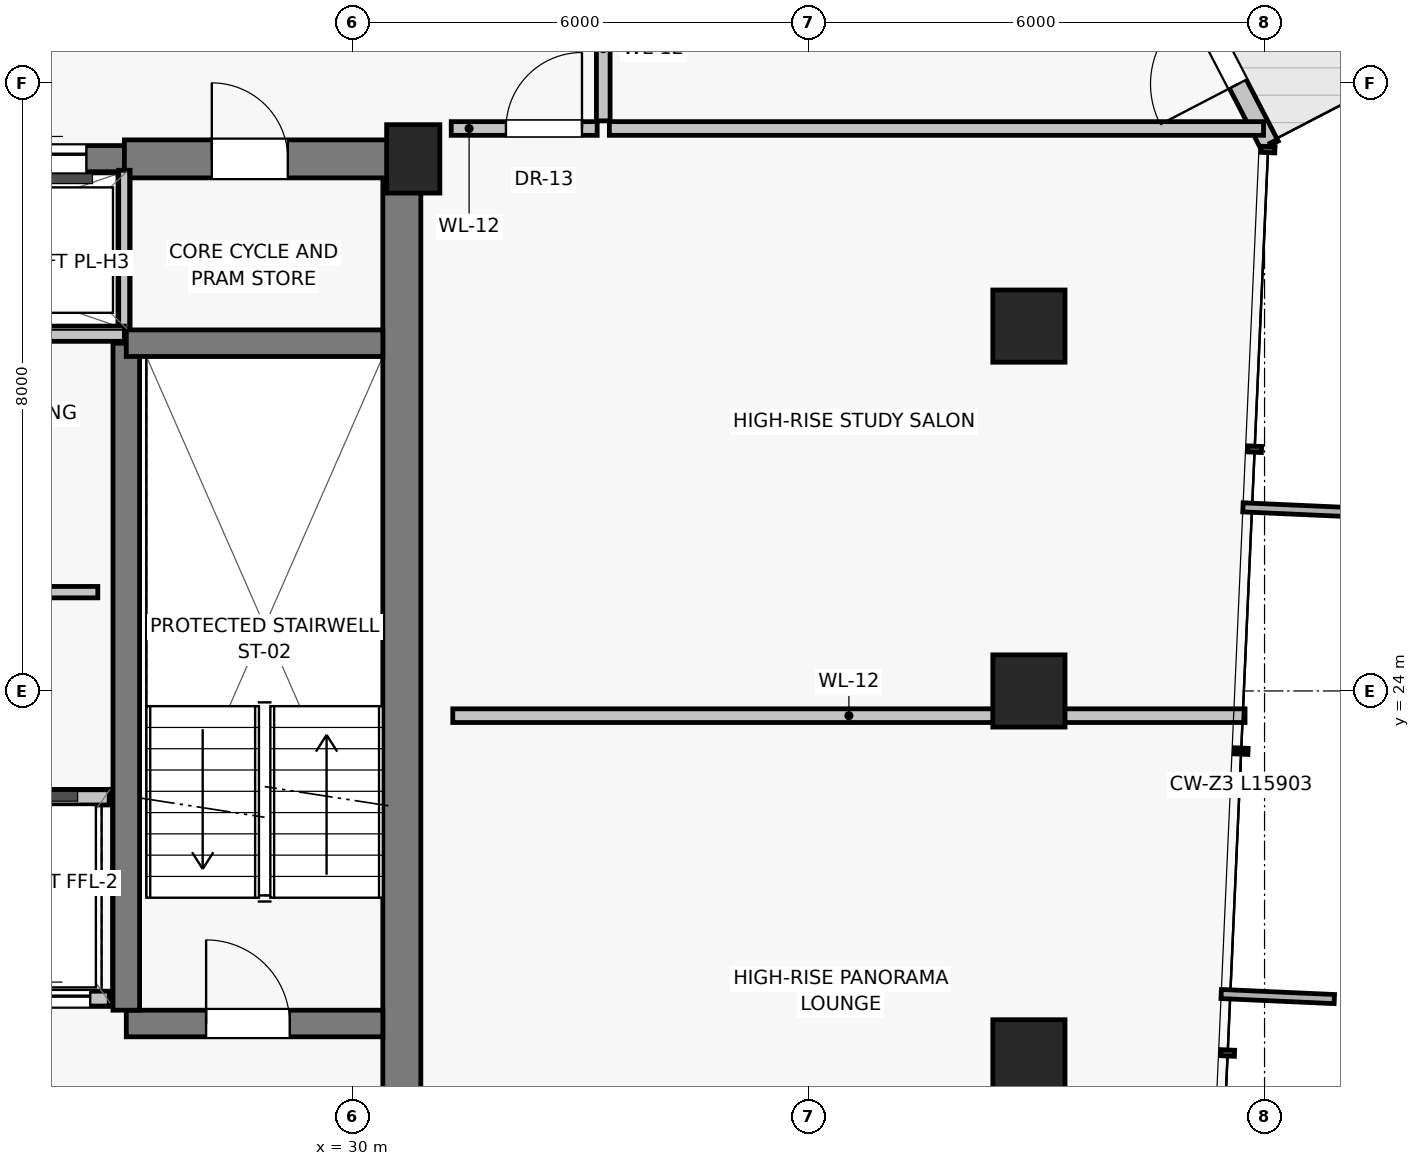
"""IFC4 building model, lengths in metres.
Left out: names, types, materials, properties, quantities, classifications, styles, units other than length and angle.
Written with IfcOpenShell. Run it as: python <this file> out.ifc"""

import sys

from ifc_helpers import new_model, si_unit, direction, frame, frame_2d, origin, origin_2d, place, context, subcontext, project, spatial, rectangle, extrude, source, transform, mapped, element, fill, save


model = new_model("IFC4")
c1 = context("Model", 3, precision=1e-05, world=origin(), true_north=direction((0.0, 1.0)))
c2 = subcontext(c1, "Body", "Model", "MODEL_VIEW")
j1 = project(units=[si_unit("LENGTHUNIT", "METRE"), si_unit("PLANEANGLEUNIT", "RADIAN")], contexts=[c1])
p1 = place(None, origin())
s1 = spatial("IfcSite", under=j1, at=p1, CompositionType="ELEMENT")
p2 = place(p1, origin())
s2 = spatial("IfcBuilding", under=s1, at=p2, CompositionType="ELEMENT")
p3 = place(p2, frame((0.0, 0.0, 215.65)))
s3 = spatial("IfcBuildingStorey", under=s2, at=p3, CompositionType="ELEMENT", Elevation=215.65)
p4 = place(p3, frame((30.8, 31.0, 0.0), z_axis=(0.0, 0.0, 1.0), x_axis=(1.0, 0.0, 0.0)))
e1 = element("IfcColumn", 1, at=p4, inside=s3, PredefinedType="PILASTER", context=c2, shape_type="SweptSolid", body=[
    extrude(rectangle(XDim=0.7, YDim=0.9, at=origin_2d()), origin(), (0.0, 0.0, 1.0), 3.25),
])
for number, where, z_axis, x_axis in (
    (2, (38.9, 19.2, 0.0), (0.0, 0.0, 1.0), (1.0, 0.0, 0.0)),
    (3, (38.9, 24.0, 0.0), (0.0, 0.0, 1.0), (1.0, 0.0, 0.0)),
    (4, (38.9, 28.8, 0.0), (0.0, 0.0, 1.0), (1.0, 0.0, 0.0)),
):
    element("IfcColumn", number, at=place(p3, frame(where, z_axis=z_axis, x_axis=x_axis)), inside=s3, PredefinedType="COLUMN", context=c2, shape_type="SweptSolid", body=[
        extrude(rectangle(XDim=0.95, YDim=0.95, at=origin_2d()), origin(), (0.0, 0.0, 1.0), 3.25),
    ])
p5 = place(p3, frame((42.069, 31.177, 0.0), z_axis=(0.0, 0.0, 1.0), x_axis=(-0.460857783271, 0.887474001646, 0.0)))
e5 = element("IfcWall", 5, at=p5, inside=s3, PredefinedType="SOLIDWALL", context=c2, shape_type="SweptSolid", body=[
    extrude(rectangle(XDim=3.914, YDim=0.25, at=frame_2d((1.957, 0.0))), origin(), (0.0, 0.0, 1.0), 3.015),
])
p6 = place(p5, frame((0.91, 0.0, 0.0)))
e6 = element("IfcOpeningElement", 6, at=p6, cuts=e5, PredefinedType="OPENING", context=c2, shape_type="SweptSolid", body=[
    extrude(rectangle(XDim=1.15, YDim=2.25, at=frame_2d((0.575, 1.125))), frame((0.0, 0.135, 0.0), z_axis=(0.0, -1.0, 0.0), x_axis=(1.0, 0.0, 0.0)), (0.0, 0.0, 1.0), 0.27),
])
p7 = place(p3, frame((30.65, 16.8, 0.0), z_axis=(0.0, 0.0, 1.0), x_axis=(0.0, 1.0, 0.0)))
e7 = element("IfcWall", 7, at=p7, inside=s3, PredefinedType="SHEAR", context=c2, shape_type="SweptSolid", body=[
    extrude(rectangle(XDim=14.2, YDim=0.5, at=frame_2d((7.1, 0.0))), origin(), (0.0, 0.0, 1.0), 3.015),
])
p8 = place(p3, frame((21.0, 31.0, 0.0), z_axis=(0.0, 0.0, 1.0), x_axis=(1.0, 0.0, 0.0)))
e8 = element("IfcWall", 8, at=p8, inside=s3, PredefinedType="SHEAR", context=c2, shape_type="SweptSolid", body=[
    extrude(rectangle(XDim=6.0, YDim=0.35, at=frame_2d((3.0, 0.0))), origin(), (0.0, 0.0, 1.0), 3.015),
])
p9 = place(p8, frame((0.5, 0.0, 0.0)))
e9 = element("IfcOpeningElement", 9, at=p9, cuts=e8, PredefinedType="OPENING", context=c2, shape_type="SweptSolid", body=[
    extrude(rectangle(XDim=1.1, YDim=2.08, at=frame_2d((0.55, 1.04))), frame((0.0, 0.185, 0.0), z_axis=(0.0, -1.0, 0.0), x_axis=(1.0, 0.0, 0.0)), (0.0, 0.0, 1.0), 0.37),
])
p10 = place(p8, frame((2.45, 0.0, 0.0)))
e10 = element("IfcOpeningElement", 10, at=p10, cuts=e8, PredefinedType="OPENING", context=c2, shape_type="SweptSolid", body=[
    extrude(rectangle(XDim=1.1, YDim=2.08, at=frame_2d((0.55, 1.04))), frame((0.0, 0.185, 0.0), z_axis=(0.0, -1.0, 0.0), x_axis=(1.0, 0.0, 0.0)), (0.0, 0.0, 1.0), 0.37),
])
p11 = place(p8, frame((4.4, 0.0, 0.0)))
e11 = element("IfcOpeningElement", 11, at=p11, cuts=e8, PredefinedType="OPENING", context=c2, shape_type="SweptSolid", body=[
    extrude(rectangle(XDim=1.1, YDim=2.08, at=frame_2d((0.55, 1.04))), frame((0.0, 0.185, 0.0), z_axis=(0.0, -1.0, 0.0), x_axis=(1.0, 0.0, 0.0)), (0.0, 0.0, 1.0), 0.37),
])
p12 = place(p3, frame((27.0, 31.0, 0.0), z_axis=(0.0, 0.0, 1.0), x_axis=(1.0, 0.0, 0.0)))
e12 = element("IfcWall", 12, at=p12, inside=s3, PredefinedType="SHEAR", context=c2, shape_type="SweptSolid", body=[
    extrude(rectangle(XDim=3.8, YDim=0.5, at=frame_2d((1.9, 0.0))), origin(), (0.0, 0.0, 1.0), 3.015),
])
p13 = place(p12, frame((1.15, 0.0, 0.0)))
e13 = element("IfcOpeningElement", 13, at=p13, cuts=e12, PredefinedType="OPENING", context=c2, shape_type="SweptSolid", body=[
    extrude(rectangle(XDim=1.0, YDim=2.01, at=frame_2d((0.5, 1.005))), frame((0.0, 0.26, 0.0), z_axis=(0.0, -1.0, 0.0), x_axis=(1.0, 0.0, 0.0)), (0.0, 0.0, 1.0), 0.52),
])
p14 = place(p3, frame((27.0, 28.65, 0.0), z_axis=(0.0, 0.0, 1.0), x_axis=(0.0, 1.0, 0.0)))
e14 = element("IfcWall", 14, at=p14, inside=s3, PredefinedType="PARTITIONING", context=c2, shape_type="SweptSolid", body=[
    extrude(rectangle(XDim=2.2, YDim=0.15, at=frame_2d((1.1, 0.0))), origin(), (0.0, 0.0, 1.0), 3.015),
])
p15 = place(p3, frame((24.95, 19.95, 0.0), z_axis=(0.0, 0.0, 1.0), x_axis=(1.0, 0.0, 0.0)))
e15 = element("IfcWall", 15, at=p15, inside=s3, PredefinedType="SOLIDWALL", context=c2, shape_type="SweptSolid", body=[
    extrude(rectangle(XDim=1.85, YDim=0.2, at=frame_2d((0.925, 0.0))), origin(), (0.0, 0.0, 1.0), 3.015),
])
p16 = place(p15, frame((0.3, 0.0, 0.0)))
e16 = element("IfcOpeningElement", 16, at=p16, cuts=e15, PredefinedType="OPENING", context=c2, shape_type="SweptSolid", body=[
    extrude(rectangle(XDim=1.3, YDim=2.25, at=frame_2d((0.65, 1.125))), frame((0.0, 0.11, 0.0), z_axis=(0.0, -1.0, 0.0), x_axis=(1.0, 0.0, 0.0)), (0.0, 0.0, 1.0), 0.22),
])
p17 = place(p3, frame((27.025, 19.625, 0.0), z_axis=(0.0, 0.0, 1.0), x_axis=(1.0, 0.0, 0.0)))
e17 = element("IfcWall", 17, at=p17, inside=s3, PredefinedType="SHEAR", context=c2, shape_type="SweptSolid", body=[
    extrude(rectangle(XDim=3.375, YDim=0.35, at=frame_2d((1.688, 0.0))), origin(), (0.0, 0.0, 1.0), 3.015),
])
p18 = place(p17, frame((1.05, 0.0, 0.0)))
e18 = element("IfcOpeningElement", 18, at=p18, cuts=e17, PredefinedType="OPENING", context=c2, shape_type="SweptSolid", body=[
    extrude(rectangle(XDim=1.1, YDim=2.03, at=frame_2d((0.55, 1.015))), frame((0.0, 0.185, 0.0), z_axis=(0.0, -1.0, 0.0), x_axis=(1.0, 0.0, 0.0)), (0.0, 0.0, 1.0), 0.37),
])
p19 = place(p3, frame((27.025, 19.8, 0.0), z_axis=(0.0, 0.0, 1.0), x_axis=(0.0, 1.0, 0.0)))
e19 = element("IfcWall", 19, at=p19, inside=s3, PredefinedType="SHEAR", context=c2, shape_type="SweptSolid", body=[
    extrude(rectangle(XDim=8.775, YDim=0.35, at=frame_2d((4.387, 0.0))), origin(), (0.0, 0.0, 1.0), 3.015),
])
p20 = place(p3, frame((27.025, 28.575, 0.0), z_axis=(0.0, 0.0, 1.0), x_axis=(1.0, 0.0, 0.0)))
e20 = element("IfcWall", 20, at=p20, inside=s3, PredefinedType="SHEAR", context=c2, shape_type="SweptSolid", body=[
    extrude(rectangle(XDim=3.375, YDim=0.35, at=frame_2d((1.688, 0.0))), origin(), (0.0, 0.0, 1.0), 3.015),
])
p21 = place(p3, frame((24.95, 22.6, 0.0), z_axis=(0.0, 0.0, 1.0), x_axis=(1.0, 0.0, 0.0)))
e21 = element("IfcWall", 21, at=p21, inside=s3, PredefinedType="SOLIDWALL", context=c2, shape_type="SweptSolid", body=[
    extrude(rectangle(XDim=1.85, YDim=0.2, at=frame_2d((0.925, 0.0))), origin(), (0.0, 0.0, 1.0), 3.015),
])
p22 = place(p3, frame((21.0, 28.7, 0.0), z_axis=(0.0, 0.0, 1.0), x_axis=(1.0, 0.0, 0.0)))
e22 = element("IfcWall", 22, at=p22, inside=s3, PredefinedType="SOLIDWALL", context=c2, shape_type="SweptSolid", body=[
    extrude(rectangle(XDim=6.0, YDim=0.2, at=frame_2d((3.0, 0.0))), origin(), (0.0, 0.0, 1.0), 3.015),
])
p23 = place(p3, frame((24.1, 25.3, 0.0), z_axis=(0.0, 0.0, 1.0), x_axis=(1.0, 0.0, 0.0)))
e23 = element("IfcWall", 23, at=p23, inside=s3, PredefinedType="PARTITIONING", context=c2, shape_type="SweptSolid", body=[
    extrude(rectangle(XDim=2.55, YDim=0.15, at=frame_2d((1.275, 0.0))), origin(), (0.0, 0.0, 1.0), 3.015),
])
p24 = place(p23, frame((0.8, 0.0, 0.0)))
e24 = element("IfcOpeningElement", 24, at=p24, cuts=e23, PredefinedType="OPENING", context=c2, shape_type="SweptSolid", body=[
    extrude(rectangle(XDim=0.86, YDim=2.01, at=frame_2d((0.43, 1.005))), frame((0.0, 0.085, 0.0), z_axis=(0.0, -1.0, 0.0), x_axis=(1.0, 0.0, 0.0)), (0.0, 0.0, 1.0), 0.17),
])
p25 = place(p3, frame((31.32, 23.675, 0.0), z_axis=(0.0, 0.0, 1.0), x_axis=(1.0, 0.0, 0.0)))
e25 = element("IfcWall", 25, at=p25, inside=s3, PredefinedType="PARTITIONING", context=c2, shape_type="SweptSolid", body=[
    extrude(rectangle(XDim=10.423, YDim=0.18, at=frame_2d((5.212, 0.0))), origin(), (0.0, 0.0, 1.0), 3.015),
])
p26 = place(p3, frame((33.3, 31.5, 0.0), z_axis=(0.0, 0.0, 1.0), x_axis=(0.0, 1.0, 0.0)))
e26 = element("IfcWall", 26, at=p26, inside=s3, PredefinedType="PARTITIONING", context=c2, shape_type="SweptSolid", body=[
    extrude(rectangle(XDim=1.9, YDim=0.18, at=frame_2d((0.95, 0.0))), origin(), (0.0, 0.0, 1.0), 3.015),
])
p27 = place(p3, frame((31.3, 31.4, 0.0), z_axis=(0.0, 0.0, 1.0), x_axis=(1.0, 0.0, 0.0)))
e27 = element("IfcWall", 27, at=p27, inside=s3, PredefinedType="PARTITIONING", context=c2, shape_type="SweptSolid", body=[
    extrude(rectangle(XDim=1.92, YDim=0.18, at=frame_2d((0.96, 0.0))), origin(), (0.0, 0.0, 1.0), 3.015),
])
p28 = place(p27, frame((0.72, 0.0, 0.0)))
e28 = element("IfcOpeningElement", 28, at=p28, cuts=e27, PredefinedType="OPENING", context=c2, shape_type="SweptSolid", body=[
    extrude(rectangle(XDim=1.0, YDim=2.01, at=frame_2d((0.5, 1.005))), frame((0.0, 0.1, 0.0), z_axis=(0.0, -1.0, 0.0), x_axis=(1.0, 0.0, 0.0)), (0.0, 0.0, 1.0), 0.2),
])
p29 = place(p3, frame((33.38, 31.4, 0.0), z_axis=(0.0, 0.0, 1.0), x_axis=(1.0, 0.0, 0.0)))
e29 = element("IfcWall", 29, at=p29, inside=s3, PredefinedType="PARTITIONING", context=c2, shape_type="SweptSolid", body=[
    extrude(rectangle(XDim=8.607, YDim=0.18, at=frame_2d((4.303, 0.0))), origin(), (0.0, 0.0, 1.0), 3.015),
])
m1 = source(origin(), c2, "Body", "SweptSolid", [
    extrude(rectangle(XDim=1.15, YDim=2.25, at=frame_2d((0.575, 1.125))), frame((0.0, 0.025, 0.0), z_axis=(0.0, -1.0, 0.0), x_axis=(1.0, 0.0, 0.0)), (0.0, 0.0, 1.0), 0.05),
])
p30 = place(p6, frame((1.15, 0.0, 0.0), z_axis=(0.0, 0.0, 1.0), x_axis=(-1.0, 0.0, 0.0)))
e30 = element("IfcDoor", 30, at=p30, inside=s3, OperationType="SINGLE_SWING_LEFT", PredefinedType="DOOR", context=c2, shape_type="MappedRepresentation", body=[
    mapped(m1, transform((0.0, 0.0, 0.0), scale=1.0)),
])
fill(e6, e30)
m2 = source(origin(), c2, "Body", "SweptSolid", [
    extrude(rectangle(XDim=1.1, YDim=2.08, at=frame_2d((0.55, 1.04))), frame((0.0, 0.025, 0.0), z_axis=(0.0, -1.0, 0.0), x_axis=(1.0, 0.0, 0.0)), (0.0, 0.0, 1.0), 0.05),
])
p31 = place(p11, origin())
e31 = element("IfcDoor", 31, at=p31, inside=s3, OperationType="SLIDING_TO_LEFT", PredefinedType="DOOR", context=c2, shape_type="MappedRepresentation", body=[
    mapped(m2, transform((0.0, 0.0, 0.0), scale=1.0)),
])
fill(e11, e31)
m3 = source(origin(), c2, "Body", "SweptSolid", [
    extrude(rectangle(XDim=1.0, YDim=2.01, at=frame_2d((0.5, 1.005))), frame((0.0, 0.025, 0.0), z_axis=(0.0, -1.0, 0.0), x_axis=(1.0, 0.0, 0.0)), (0.0, 0.0, 1.0), 0.05),
])
p32 = place(p13, origin())
e32 = element("IfcDoor", 32, at=p32, inside=s3, OperationType="SINGLE_SWING_LEFT", PredefinedType="DOOR", context=c2, shape_type="MappedRepresentation", body=[
    mapped(m3, transform((0.0, 0.0, 0.0), scale=1.0)),
])
fill(e13, e32)
m4 = source(origin(), c2, "Body", "SweptSolid", [
    extrude(rectangle(XDim=1.3, YDim=2.25, at=frame_2d((0.65, 1.125))), frame((0.0, 0.025, 0.0), z_axis=(0.0, -1.0, 0.0), x_axis=(1.0, 0.0, 0.0)), (0.0, 0.0, 1.0), 0.05),
])
p33 = place(p16, origin())
e33 = element("IfcDoor", 33, at=p33, inside=s3, OperationType="SLIDING_TO_LEFT", PredefinedType="DOOR", context=c2, shape_type="MappedRepresentation", body=[
    mapped(m4, transform((0.0, 0.0, 0.0), scale=1.0)),
])
fill(e16, e33)
m5 = source(origin(), c2, "Body", "SweptSolid", [
    extrude(rectangle(XDim=1.1, YDim=2.03, at=frame_2d((0.55, 1.015))), frame((0.0, 0.025, 0.0), z_axis=(0.0, -1.0, 0.0), x_axis=(1.0, 0.0, 0.0)), (0.0, 0.0, 1.0), 0.05),
])
p34 = place(p18, origin())
e34 = element("IfcDoor", 34, at=p34, inside=s3, OperationType="SINGLE_SWING_LEFT", PredefinedType="DOOR", context=c2, shape_type="MappedRepresentation", body=[
    mapped(m5, transform((0.0, 0.0, 0.0), scale=1.0)),
])
fill(e18, e34)
p35 = place(p28, origin())
e35 = element("IfcDoor", 35, at=p35, inside=s3, OperationType="SINGLE_SWING_RIGHT", PredefinedType="DOOR", context=c2, shape_type="MappedRepresentation", body=[
    mapped(m3, transform((0.0, 0.0, 0.0), scale=1.0)),
])
fill(e28, e35)
save(model, sys.argv[1])
